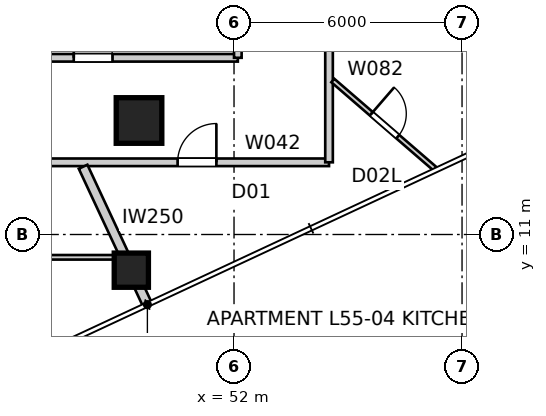
"""IFC4 building model, lengths in metres.
Left out: names, types, materials, properties, quantities, classifications, styles, units other than length and angle.
Written with IfcOpenShell. Run it as: python <this file> out.ifc"""

import sys

from ifc_helpers import new_model, si_unit, direction, frame, frame_2d, origin, origin_2d, place, context, subcontext, project, spatial, rectangle, extrude, element, fill, save


model = new_model("IFC4")
c1 = context("Model", 3, precision=1e-05, world=origin(), true_north=direction((0.0, 1.0)))
c2 = subcontext(c1, "Body", "Model", "MODEL_VIEW")
j1 = project(units=[si_unit("LENGTHUNIT", "METRE"), si_unit("PLANEANGLEUNIT", "RADIAN")], contexts=[c1])
p1 = place(None, origin())
s1 = spatial("IfcSite", under=j1, at=p1, CompositionType="ELEMENT")
p2 = place(p1, origin())
s2 = spatial("IfcBuilding", under=s1, at=p2, CompositionType="ELEMENT")
p3 = place(p2, frame((0.0, 0.0, 199.8)))
s3 = spatial("IfcBuildingStorey", under=s2, at=p3, CompositionType="ELEMENT", Elevation=199.8)
p4 = place(p3, frame((49.298, 10.061, 0.0), z_axis=(0.0, 0.0, 1.0), x_axis=(1.0, 0.0, 0.0)))
e1 = element("IfcColumn", 1, at=p4, inside=s3, PredefinedType="COLUMN", context=c2, shape_type="SweptSolid", body=[
    extrude(rectangle(XDim=0.9, YDim=0.9, at=origin_2d()), origin(), (0.0, 0.0, 1.0), 3.2),
])
p5 = place(p3, frame((49.5, 14.0, 0.0), z_axis=(0.0, 0.0, 1.0), x_axis=(1.0, 0.0, 0.0)))
e2 = element("IfcColumn", 2, at=p5, inside=s3, PredefinedType="COLUMN", context=c2, shape_type="SweptSolid", body=[
    extrude(rectangle(XDim=1.2, YDim=1.2, at=origin_2d()), origin(), (0.0, 0.0, 1.0), 3.4),
])
p6 = place(p3, frame((46.403, 12.9, 0.0), z_axis=(0.0, 0.0, 1.0), x_axis=(1.0, 0.0, 0.0)))
e3 = element("IfcWall", 3, at=p6, inside=s3, PredefinedType="PARTITIONING", context=c2, shape_type="SweptSolid", body=[
    extrude(rectangle(XDim=8.097, YDim=0.2, at=frame_2d((4.048, 0.0))), origin(), (0.0, 0.0, 1.0), 3.2),
])
p7 = place(p6, frame((4.112, 0.0, 0.0)))
e4 = element("IfcOpeningElement", 4, at=p7, cuts=e3, PredefinedType="OPENING", context=c2, shape_type="SweptSolid", body=[
    extrude(rectangle(XDim=1.02, YDim=2.34, at=frame_2d((0.51, 1.17))), frame((0.0, 0.11, 0.0), z_axis=(0.0, -1.0, 0.0), x_axis=(1.0, 0.0, 0.0)), (0.0, 0.0, 1.0), 0.22),
])
p8 = place(p3, frame((54.5, 12.9, 0.0), z_axis=(0.0, 0.0, 1.0), x_axis=(0.0, 1.0, 0.0)))
e5 = element("IfcWall", 5, at=p8, inside=s3, PredefinedType="PARTITIONING", context=c2, shape_type="SweptSolid", body=[
    extrude(rectangle(XDim=33.8, YDim=0.2, at=frame_2d((16.9, 0.0))), origin(), (0.0, 0.0, 1.0), 3.2),
])
p9 = place(p8, frame((24.911, 0.0, 0.0)))
e6 = element("IfcOpeningElement", 6, at=p9, cuts=e5, PredefinedType="OPENING", context=c2, shape_type="SweptSolid", body=[
    extrude(rectangle(XDim=1.02, YDim=2.34, at=frame_2d((0.51, 1.17))), frame((0.0, 0.11, 0.0), z_axis=(0.0, -1.0, 0.0), x_axis=(1.0, 0.0, 0.0)), (0.0, 0.0, 1.0), 0.22),
])
p10 = place(p8, frame((14.759, 0.0, 0.0)))
e7 = element("IfcOpeningElement", 7, at=p10, cuts=e5, PredefinedType="OPENING", context=c2, shape_type="SweptSolid", body=[
    extrude(rectangle(XDim=1.02, YDim=2.34, at=frame_2d((0.51, 1.17))), frame((0.0, 0.11, 0.0), z_axis=(0.0, -1.0, 0.0), x_axis=(1.0, 0.0, 0.0)), (0.0, 0.0, 1.0), 0.22),
])
p11 = place(p3, frame((49.72, 9.155, 0.0), z_axis=(0.0, 0.0, 1.0), x_axis=(-0.422605017068, 0.906313963011, 0.0)))
e8 = element("IfcWall", 8, at=p11, inside=s3, PredefinedType="PARTITIONING", context=c2, shape_type="SweptSolid", body=[
    extrude(rectangle(XDim=4.003, YDim=0.25, at=frame_2d((2.002, 0.0))), origin(), (0.0, 0.0, 1.0), 3.2),
])
p12 = place(p3, frame((27.9, 15.65, 0.0), z_axis=(0.0, 0.0, 1.0), x_axis=(1.0, 0.0, 0.0)))
e9 = element("IfcWall", 9, at=p12, inside=s3, PredefinedType="PARTITIONING", context=c2, shape_type="SweptSolid", body=[
    extrude(rectangle(XDim=24.2, YDim=0.2, at=frame_2d((12.1, 0.0))), origin(), (0.0, 0.0, 1.0), 3.2),
])
p13 = place(p12, frame((12.437, 0.0, 0.0)))
e10 = element("IfcOpeningElement", 10, at=p13, cuts=e9, PredefinedType="OPENING", context=c2, shape_type="SweptSolid", body=[
    extrude(rectangle(XDim=1.02, YDim=2.1, at=frame_2d((0.51, 1.05))), frame((0.0, 0.11, 0.0), z_axis=(0.0, -1.0, 0.0), x_axis=(1.0, 0.0, 0.0)), (0.0, 0.0, 1.0), 0.22),
])
p14 = place(p12, frame((3.544, 0.0, 0.0)))
e11 = element("IfcOpeningElement", 11, at=p14, cuts=e9, PredefinedType="OPENING", context=c2, shape_type="SweptSolid", body=[
    extrude(rectangle(XDim=1.02, YDim=2.1, at=frame_2d((0.51, 1.05))), frame((0.0, 0.11, 0.0), z_axis=(0.0, -1.0, 0.0), x_axis=(1.0, 0.0, 0.0)), (0.0, 0.0, 1.0), 0.22),
])
p15 = place(p12, frame((19.883, 0.0, 0.0)))
e12 = element("IfcOpeningElement", 12, at=p15, cuts=e9, PredefinedType="OPENING", context=c2, shape_type="SweptSolid", body=[
    extrude(rectangle(XDim=1.02, YDim=2.1, at=frame_2d((0.51, 1.05))), frame((0.0, 0.11, 0.0), z_axis=(0.0, -1.0, 0.0), x_axis=(1.0, 0.0, 0.0)), (0.0, 0.0, 1.0), 0.22),
])
p16 = place(p3, frame((52.1, 15.65, 0.0), z_axis=(0.0, 0.0, 1.0), x_axis=(0.0, 1.0, 0.0)))
e13 = element("IfcWall", 13, at=p16, inside=s3, PredefinedType="PARTITIONING", context=c2, shape_type="SweptSolid", body=[
    extrude(rectangle(XDim=3.17, YDim=0.2, at=frame_2d((1.585, 0.0))), origin(), (0.0, 0.0, 1.0), 3.2),
])
p17 = place(p3, frame((49.14, 10.4, 0.0), z_axis=(0.0, 0.0, 1.0), x_axis=(-1.0, 0.0, 0.0)))
e14 = element("IfcWall", 14, at=p17, inside=s3, PredefinedType="PARTITIONING", context=c2, shape_type="SweptSolid", body=[
    extrude(rectangle(XDim=25.333, YDim=0.12, at=frame_2d((12.667, 0.0))), origin(), (0.0, 0.0, 1.0), 3.2),
])
p18 = place(p17, frame((2.188, 0.0, 0.0)))
e15 = element("IfcOpeningElement", 15, at=p18, cuts=e14, PredefinedType="OPENING", context=c2, shape_type="SweptSolid", body=[
    extrude(rectangle(XDim=0.92, YDim=2.34, at=frame_2d((0.46, 1.17))), frame((0.0, 0.07, 0.0), z_axis=(0.0, -1.0, 0.0), x_axis=(1.0, 0.0, 0.0)), (0.0, 0.0, 1.0), 0.14),
])
p19 = place(p17, frame((21.46, 0.0, 0.0)))
e16 = element("IfcOpeningElement", 16, at=p19, cuts=e14, PredefinedType="OPENING", context=c2, shape_type="SweptSolid", body=[
    extrude(rectangle(XDim=0.92, YDim=2.34, at=frame_2d((0.46, 1.17))), frame((0.0, 0.07, 0.0), z_axis=(0.0, -1.0, 0.0), x_axis=(1.0, 0.0, 0.0)), (0.0, 0.0, 1.0), 0.14),
])
p20 = place(p17, frame((8.035, 0.0, 0.0)))
e17 = element("IfcOpeningElement", 17, at=p20, cuts=e14, PredefinedType="OPENING", context=c2, shape_type="SweptSolid", body=[
    extrude(rectangle(XDim=0.96, YDim=2.1, at=frame_2d((0.48, 1.05))), frame((0.0, 0.07, 0.0), z_axis=(0.0, -1.0, 0.0), x_axis=(1.0, 0.0, 0.0)), (0.0, 0.0, 1.0), 0.14),
])
p21 = place(p17, frame((16.14, 0.0, 0.0)))
e18 = element("IfcOpeningElement", 18, at=p21, cuts=e14, PredefinedType="OPENING", context=c2, shape_type="SweptSolid", body=[
    extrude(rectangle(XDim=0.96, YDim=2.1, at=frame_2d((0.48, 1.05))), frame((0.0, 0.07, 0.0), z_axis=(0.0, -1.0, 0.0), x_axis=(1.0, 0.0, 0.0)), (0.0, 0.0, 1.0), 0.14),
])
p22 = place(p17, frame((12.283, 0.0, 0.0)))
e19 = element("IfcOpeningElement", 19, at=p22, cuts=e14, PredefinedType="OPENING", context=c2, shape_type="SweptSolid", body=[
    extrude(rectangle(XDim=0.96, YDim=2.1, at=frame_2d((0.48, 1.05))), frame((0.0, 0.07, 0.0), z_axis=(0.0, -1.0, 0.0), x_axis=(1.0, 0.0, 0.0)), (0.0, 0.0, 1.0), 0.14),
])
p23 = place(p3, frame((54.6, 15.052, 0.0), z_axis=(0.0, 0.0, 1.0), x_axis=(0.756558808476, -0.653925660391, 0.0)))
e20 = element("IfcWall", 20, at=p23, inside=s3, PredefinedType="PARTITIONING", context=c2, shape_type="SweptSolid", body=[
    extrude(rectangle(XDim=3.554, YDim=0.12, at=frame_2d((1.777, 0.0))), origin(), (0.0, 0.0, 1.0), 3.2),
])
p24 = place(p23, frame((1.339, 0.0, 0.0)))
e21 = element("IfcOpeningElement", 21, at=p24, cuts=e20, PredefinedType="OPENING", context=c2, shape_type="SweptSolid", body=[
    extrude(rectangle(XDim=0.92, YDim=2.1, at=frame_2d((0.46, 1.05))), frame((0.0, 0.07, 0.0), z_axis=(0.0, -1.0, 0.0), x_axis=(1.0, 0.0, 0.0)), (0.0, 0.0, 1.0), 0.14),
])
p25 = place(p7, origin())
e22 = element("IfcDoor", 22, at=p25, inside=s3, OperationType="SINGLE_SWING_RIGHT", PredefinedType="DOOR", context=c2, shape_type="SweptSolid", body=[
    extrude(rectangle(XDim=1.02, YDim=2.34, at=frame_2d((0.51, 1.17))), frame((0.0, 0.025, 0.0), z_axis=(0.0, -1.0, 0.0), x_axis=(1.0, 0.0, 0.0)), (0.0, 0.0, 1.0), 0.05),
])
fill(e4, e22)
p26 = place(p15, origin())
e23 = element("IfcDoor", 23, at=p26, inside=s3, OperationType="SINGLE_SWING_LEFT", PredefinedType="DOOR", context=c2, shape_type="SweptSolid", body=[
    extrude(rectangle(XDim=1.02, YDim=2.1, at=frame_2d((0.51, 1.05))), frame((0.0, 0.025, 0.0), z_axis=(0.0, -1.0, 0.0), x_axis=(1.0, 0.0, 0.0)), (0.0, 0.0, 1.0), 0.05),
])
fill(e12, e23)
p27 = place(p24, origin())
e24 = element("IfcDoor", 24, at=p27, inside=s3, OperationType="SINGLE_SWING_LEFT", PredefinedType="DOOR", context=c2, shape_type="SweptSolid", body=[
    extrude(rectangle(XDim=0.92, YDim=2.1, at=frame_2d((0.46, 1.05))), frame((0.0, 0.025, 0.0), z_axis=(0.0, -1.0, 0.0), x_axis=(1.0, 0.0, 0.0)), (0.0, 0.0, 1.0), 0.05),
])
fill(e21, e24)
save(model, sys.argv[1])
